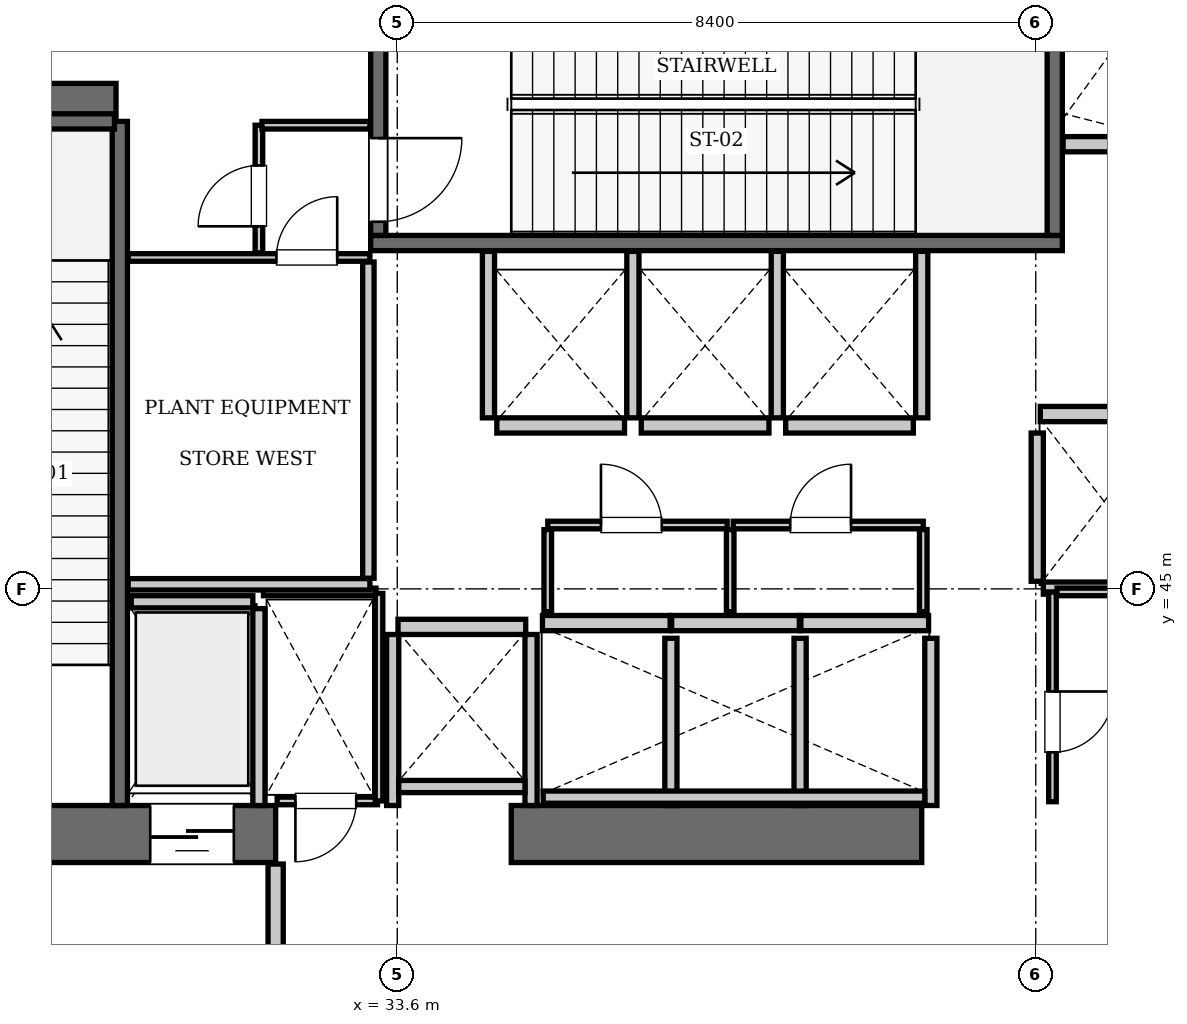
"""IFC4 building model, lengths in metres.
Left out: names, types, materials, properties, quantities, classifications, styles, units other than length and angle.
Written with IfcOpenShell. Run it as: python <this file> out.ifc"""

import sys

from ifc_helpers import new_model, si_unit, direction, frame, frame_2d, origin, place, context, subcontext, project, spatial, rectangle, extrude, element, fill, save


model = new_model("IFC4")
c1 = context("Model", 3, precision=1e-05, world=origin(), true_north=direction((0.0, 1.0)))
c2 = subcontext(c1, "Body", "Model", "MODEL_VIEW")
j1 = project(units=[si_unit("LENGTHUNIT", "METRE"), si_unit("PLANEANGLEUNIT", "RADIAN")], contexts=[c1])
p1 = place(None, origin())
s1 = spatial("IfcSite", under=j1, at=p1, CompositionType="ELEMENT")
p2 = place(p1, origin())
s2 = spatial("IfcBuilding", under=s1, at=p2, CompositionType="ELEMENT")
p3 = place(p2, frame((0.0, 0.0, 227.5)))
s3 = spatial("IfcBuildingStorey", under=s2, at=p3, CompositionType="ELEMENT", Elevation=227.5)
p4 = place(p3, frame((25.2, 41.775, 0.0), z_axis=(0.0, 0.0, 1.0), x_axis=(1.0, 0.0, 0.0)))
e1 = element("IfcWall", 1, at=p4, inside=s3, PredefinedType="SHEAR", context=c2, shape_type="SweptSolid", body=[
    extrude(rectangle(XDim=6.8, YDim=0.75, at=frame_2d((3.4, 0.0))), origin(), (0.0, 0.0, 1.0), 7.0),
])
p5 = place(p4, frame((1.65, 0.0, 0.0)))
e2 = element("IfcOpeningElement", 2, at=p5, cuts=e1, PredefinedType="OPENING", context=c2, shape_type="SweptSolid", body=[
    extrude(rectangle(XDim=1.15, YDim=2.15, at=frame_2d((0.575, 1.075))), frame((0.0, 0.385, 0.0), z_axis=(0.0, -1.0, 0.0), x_axis=(1.0, 0.0, 0.0)), (0.0, 0.0, 1.0), 0.77),
])
p6 = place(p4, frame((5.15, 0.0, 0.0)))
e3 = element("IfcOpeningElement", 3, at=p6, cuts=e1, PredefinedType="OPENING", context=c2, shape_type="SweptSolid", body=[
    extrude(rectangle(XDim=1.1, YDim=2.2, at=frame_2d((0.55, 1.1))), frame((0.0, 0.385, 0.0), z_axis=(0.0, -1.0, 0.0), x_axis=(1.0, 0.0, 0.0)), (0.0, 0.0, 1.0), 0.77),
])
p7 = place(p3, frame((35.1, 41.775, 0.0), z_axis=(0.0, 0.0, 1.0), x_axis=(1.0, 0.0, 0.0)))
e4 = element("IfcWall", 4, at=p7, inside=s3, PredefinedType="SHEAR", context=c2, shape_type="SweptSolid", body=[
    extrude(rectangle(XDim=5.4, YDim=0.75, at=frame_2d((2.7, 0.0))), origin(), (0.0, 0.0, 1.0), 7.0),
])
p8 = place(p3, frame((25.95, 51.4, 0.0), z_axis=(0.0, 0.0, 1.0), x_axis=(1.0, 0.0, 0.0)))
e5 = element("IfcWall", 5, at=p8, inside=s3, PredefinedType="SHEAR", context=c2, shape_type="SweptSolid", body=[
    extrude(rectangle(XDim=3.95, YDim=0.5, at=frame_2d((1.975, 0.0))), origin(), (0.0, 0.0, 1.0), 7.0),
])
p9 = place(p3, frame((29.95, 42.15, 0.0), z_axis=(0.0, 0.0, 1.0), x_axis=(0.0, 1.0, 0.0)))
e6 = element("IfcWall", 6, at=p9, inside=s3, PredefinedType="SOLIDWALL", context=c2, shape_type="SweptSolid", body=[
    extrude(rectangle(XDim=9.0, YDim=0.2, at=frame_2d((4.5, 0.0))), origin(), (0.0, 0.0, 1.0), 6.76),
])
p10 = place(p3, frame((26.38, 51.15, 0.0), z_axis=(0.0, 0.0, 1.0), x_axis=(1.0, 0.0, 0.0)))
e7 = element("IfcWall", 7, at=p10, inside=s3, PredefinedType="SOLIDWALL", context=c2, shape_type="SweptSolid", body=[
    extrude(rectangle(XDim=3.5, YDim=0.2, at=frame_2d((1.75, 0.0))), origin(), (0.0, 0.0, 1.0), 6.76),
])
p11 = place(p3, frame((33.25, 49.55, 0.0), z_axis=(0.0, 0.0, 1.0), x_axis=(1.0, 0.0, 0.0)))
e8 = element("IfcWall", 8, at=p11, inside=s3, PredefinedType="SOLIDWALL", context=c2, shape_type="SweptSolid", body=[
    extrude(rectangle(XDim=9.1, YDim=0.2, at=frame_2d((4.55, 0.0))), origin(), (0.0, 0.0, 1.0), 6.76),
])
p12 = place(p3, frame((42.25, 49.65, 0.0), z_axis=(0.0, 0.0, 1.0), x_axis=(0.0, 1.0, 0.0)))
e9 = element("IfcWall", 9, at=p12, inside=s3, PredefinedType="SOLIDWALL", context=c2, shape_type="SweptSolid", body=[
    extrude(rectangle(XDim=3.6, YDim=0.2, at=frame_2d((1.8, 0.0))), origin(), (0.0, 0.0, 1.0), 6.76),
])
p13 = place(p3, frame((33.35, 49.65, 0.0), z_axis=(0.0, 0.0, 1.0), x_axis=(0.0, 1.0, 0.0)))
e10 = element("IfcWall", 10, at=p13, inside=s3, PredefinedType="SOLIDWALL", context=c2, shape_type="SweptSolid", body=[
    extrude(rectangle(XDim=3.6, YDim=0.2, at=frame_2d((1.8, 0.0))), origin(), (0.0, 0.0, 1.0), 6.76),
])
p14 = place(p13, frame((0.18, 0.0, 0.0)))
e11 = element("IfcOpeningElement", 11, at=p14, cuts=e10, PredefinedType="OPENING", context=c2, shape_type="SweptSolid", body=[
    extrude(rectangle(XDim=1.1, YDim=2.15, at=frame_2d((0.55, 1.075))), frame((0.0, 0.11, 0.0), z_axis=(0.0, -1.0, 0.0), x_axis=(1.0, 0.0, 0.0)), (0.0, 0.0, 1.0), 0.22),
])
p15 = place(p3, frame((42.06, 47.3, 0.0), z_axis=(0.0, 0.0, 1.0), x_axis=(1.0, 0.0, 0.0)))
e12 = element("IfcWall", 12, at=p15, inside=s3, PredefinedType="SOLIDWALL", context=c2, shape_type="SweptSolid", body=[
    extrude(rectangle(XDim=1.68, YDim=0.2, at=frame_2d((0.84, 0.0))), origin(), (0.0, 0.0, 1.0), 6.76),
])
p16 = place(p3, frame((42.36, 50.85, 0.0), z_axis=(0.0, 0.0, 1.0), x_axis=(1.0, 0.0, 0.0)))
e13 = element("IfcWall", 13, at=p16, inside=s3, PredefinedType="SOLIDWALL", context=c2, shape_type="SweptSolid", body=[
    extrude(rectangle(XDim=1.38, YDim=0.2, at=frame_2d((0.69, 0.0))), origin(), (0.0, 0.0, 1.0), 6.76),
])
for number, where, z_axis, x_axis in (
    (14, (35.51, 44.55, 0.0), (0.0, 0.0, 1.0), (1.0, 0.0, 0.0)),
    (15, (37.21, 44.55, 0.0), (0.0, 0.0, 1.0), (1.0, 0.0, 0.0)),
):
    element("IfcWall", number, at=place(p3, frame(where, z_axis=z_axis, x_axis=x_axis)), inside=s3, PredefinedType="SOLIDWALL", context=c2, shape_type="SweptSolid", body=[
        extrude(rectangle(XDim=1.68, YDim=0.2, at=frame_2d((0.84, 0.0))), origin(), (0.0, 0.0, 1.0), 6.76),
    ])
for number, where, z_axis, x_axis in (
    (16, (38.91, 44.55, 0.0), (0.0, 0.0, 1.0), (1.0, 0.0, 0.0)),
    (17, (34.91, 47.15, 0.0), (0.0, 0.0, 1.0), (1.0, 0.0, 0.0)),
):
    element("IfcWall", number, at=place(p3, frame(where, z_axis=z_axis, x_axis=x_axis)), inside=s3, PredefinedType="SOLIDWALL", context=c2, shape_type="SweptSolid", body=[
        extrude(rectangle(XDim=1.68, YDim=0.2, at=frame_2d((0.84, 0.0))), origin(), (0.0, 0.0, 1.0), 6.76),
    ])
for number, where, z_axis, x_axis in (
    (18, (36.81, 47.15, 0.0), (0.0, 0.0, 1.0), (1.0, 0.0, 0.0)),
    (19, (38.71, 47.15, 0.0), (0.0, 0.0, 1.0), (1.0, 0.0, 0.0)),
    (20, (33.61, 44.5, 0.0), (0.0, 0.0, 1.0), (1.0, 0.0, 0.0)),
):
    element("IfcWall", number, at=place(p3, frame(where, z_axis=z_axis, x_axis=x_axis)), inside=s3, PredefinedType="SOLIDWALL", context=c2, shape_type="SweptSolid", body=[
        extrude(rectangle(XDim=1.68, YDim=0.2, at=frame_2d((0.84, 0.0))), origin(), (0.0, 0.0, 1.0), 6.76),
    ])
p17 = place(p3, frame((30.1, 44.83, 0.0), z_axis=(0.0, 0.0, 1.0), x_axis=(1.0, 0.0, 0.0)))
e21 = element("IfcWall", 21, at=p17, inside=s3, PredefinedType="SOLIDWALL", context=c2, shape_type="SweptSolid", body=[
    extrude(rectangle(XDim=1.6, YDim=0.16, at=frame_2d((0.8, 0.0))), origin(), (0.0, 0.0, 1.0), 6.76),
])
p18 = place(p3, frame((31.78, 42.15, 0.0), z_axis=(0.0, 0.0, 1.0), x_axis=(0.0, 1.0, 0.0)))
e22 = element("IfcWall", 22, at=p18, inside=s3, PredefinedType="SOLIDWALL", context=c2, shape_type="SweptSolid", body=[
    extrude(rectangle(XDim=2.59, YDim=0.16, at=frame_2d((1.295, 0.0))), origin(), (0.0, 0.0, 1.0), 6.76),
])
p19 = place(p3, frame((42.02, 45.1, 0.0), z_axis=(0.0, 0.0, 1.0), x_axis=(0.0, 1.0, 0.0)))
e23 = element("IfcWall", 23, at=p19, inside=s3, PredefinedType="SOLIDWALL", context=c2, shape_type="SweptSolid", body=[
    extrude(rectangle(XDim=1.95, YDim=0.16, at=frame_2d((0.975, 0.0))), origin(), (0.0, 0.0, 1.0), 6.76),
])
p20 = place(p3, frame((42.1, 45.01, 0.0), z_axis=(0.0, 0.0, 1.0), x_axis=(1.0, 0.0, 0.0)))
e24 = element("IfcWall", 24, at=p20, inside=s3, PredefinedType="SOLIDWALL", context=c2, shape_type="SweptSolid", body=[
    extrude(rectangle(XDim=3.45, YDim=0.16, at=frame_2d((1.725, 0.0))), origin(), (0.0, 0.0, 1.0), 6.76),
])
for number, where, z_axis, x_axis in (
    (25, (37.2, 42.15, 0.0), (0.0, 0.0, 1.0), (0.0, 1.0, 0.0)),
    (26, (38.9, 42.15, 0.0), (0.0, 0.0, 1.0), (0.0, 1.0, 0.0)),
    (27, (40.62, 42.15, 0.0), (0.0, 0.0, 1.0), (0.0, 1.0, 0.0)),
):
    element("IfcWall", number, at=place(p3, frame(where, z_axis=z_axis, x_axis=x_axis)), inside=s3, PredefinedType="SOLIDWALL", context=c2, shape_type="SweptSolid", body=[
        extrude(rectangle(XDim=2.2, YDim=0.16, at=frame_2d((1.1, 0.0))), origin(), (0.0, 0.0, 1.0), 6.76),
    ])
p21 = place(p3, frame((35.52, 42.26, 0.0), z_axis=(0.0, 0.0, 1.0), x_axis=(1.0, 0.0, 0.0)))
e28 = element("IfcWall", 28, at=p21, inside=s3, PredefinedType="SOLIDWALL", context=c2, shape_type="SweptSolid", body=[
    extrude(rectangle(XDim=5.02, YDim=0.16, at=frame_2d((2.51, 0.0))), origin(), (0.0, 0.0, 1.0), 6.76),
])
for number, where, z_axis, x_axis in (
    (29, (34.8, 47.25, 0.0), (0.0, 0.0, 1.0), (0.0, 1.0, 0.0)),
    (30, (36.7, 47.25, 0.0), (0.0, 0.0, 1.0), (0.0, 1.0, 0.0)),
    (31, (38.6, 47.25, 0.0), (0.0, 0.0, 1.0), (0.0, 1.0, 0.0)),
    (32, (40.5, 47.25, 0.0), (0.0, 0.0, 1.0), (0.0, 1.0, 0.0)),
):
    element("IfcWall", number, at=place(p3, frame(where, z_axis=z_axis, x_axis=x_axis)), inside=s3, PredefinedType="SOLIDWALL", context=c2, shape_type="SweptSolid", body=[
        extrude(rectangle(XDim=2.19, YDim=0.16, at=frame_2d((1.095, 0.0))), origin(), (0.0, 0.0, 1.0), 6.76),
    ])
for number, where, z_axis, x_axis in (
    (33, (33.54, 42.15, 0.0), (0.0, 0.0, 1.0), (0.0, 1.0, 0.0)),
    (34, (35.36, 42.15, 0.0), (0.0, 0.0, 1.0), (0.0, 1.0, 0.0)),
):
    element("IfcWall", number, at=place(p3, frame(where, z_axis=z_axis, x_axis=x_axis)), inside=s3, PredefinedType="SOLIDWALL", context=c2, shape_type="SweptSolid", body=[
        extrude(rectangle(XDim=2.25, YDim=0.16, at=frame_2d((1.125, 0.0))), origin(), (0.0, 0.0, 1.0), 6.76),
    ])
p22 = place(p3, frame((33.62, 42.4, 0.0), z_axis=(0.0, 0.0, 1.0), x_axis=(1.0, 0.0, 0.0)))
e35 = element("IfcWall", 35, at=p22, inside=s3, PredefinedType="SOLIDWALL", context=c2, shape_type="SweptSolid", body=[
    extrude(rectangle(XDim=1.66, YDim=0.16, at=frame_2d((0.83, 0.0))), origin(), (0.0, 0.0, 1.0), 6.76),
])
p23 = place(p3, frame((32.0, 38.31, 0.0), z_axis=(0.0, 0.0, 1.0), x_axis=(0.0, 1.0, 0.0)))
e36 = element("IfcWall", 36, at=p23, inside=s3, PredefinedType="PARTITIONING", context=c2, shape_type="SweptSolid", body=[
    extrude(rectangle(XDim=3.07, YDim=0.2, at=frame_2d((1.535, 0.0))), origin(), (0.0, 0.0, 1.0), 6.76),
])
p24 = place(p3, frame((32.02, 42.21, 0.0), z_axis=(0.0, 0.0, 1.0), x_axis=(1.0, 0.0, 0.0)))
e37 = element("IfcWall", 37, at=p24, inside=s3, PredefinedType="PARTITIONING", context=c2, shape_type="SweptSolid", body=[
    extrude(rectangle(XDim=1.32, YDim=0.1, at=frame_2d((0.66, 0.0))), origin(), (0.0, 0.0, 1.0), 6.76),
])
p25 = place(p24, frame((0.24, 0.0, 0.0)))
e38 = element("IfcOpeningElement", 38, at=p25, cuts=e37, PredefinedType="OPENING", context=c2, shape_type="SweptSolid", body=[
    extrude(rectangle(XDim=0.8, YDim=2.05, at=frame_2d((0.4, 1.025))), frame((0.0, 0.06, 0.0), z_axis=(0.0, -1.0, 0.0), x_axis=(1.0, 0.0, 0.0)), (0.0, 0.0, 1.0), 0.12),
])
p26 = place(p3, frame((31.84, 44.96, 0.0), z_axis=(0.0, 0.0, 1.0), x_axis=(1.0, 0.0, 0.0)))
e39 = element("IfcWall", 39, at=p26, inside=s3, PredefinedType="PARTITIONING", context=c2, shape_type="SweptSolid", body=[
    extrude(rectangle(XDim=1.48, YDim=0.1, at=frame_2d((0.74, 0.0))), origin(), (0.0, 0.0, 1.0), 6.76),
])
p27 = place(p3, frame((33.36, 42.21, 0.0), z_axis=(0.0, 0.0, 1.0), x_axis=(0.0, 1.0, 0.0)))
e40 = element("IfcWall", 40, at=p27, inside=s3, PredefinedType="PARTITIONING", context=c2, shape_type="SweptSolid", body=[
    extrude(rectangle(XDim=2.73, YDim=0.1, at=frame_2d((1.365, 0.0))), origin(), (0.0, 0.0, 1.0), 6.76),
])
p28 = place(p3, frame((35.58, 45.84, 0.0), z_axis=(0.0, 0.0, 1.0), x_axis=(1.0, 0.0, 0.0)))
e41 = element("IfcWall", 41, at=p28, inside=s3, PredefinedType="PARTITIONING", context=c2, shape_type="SweptSolid", body=[
    extrude(rectangle(XDim=2.36, YDim=0.1, at=frame_2d((1.18, 0.0))), origin(), (0.0, 0.0, 1.0), 6.76),
])
p29 = place(p28, frame((0.7, 0.0, 0.0)))
e42 = element("IfcOpeningElement", 42, at=p29, cuts=e41, PredefinedType="OPENING", context=c2, shape_type="SweptSolid", body=[
    extrude(rectangle(XDim=0.8, YDim=2.05, at=frame_2d((0.4, 1.025))), frame((0.0, 0.06, 0.0), z_axis=(0.0, -1.0, 0.0), x_axis=(1.0, 0.0, 0.0)), (0.0, 0.0, 1.0), 0.12),
])
p30 = place(p3, frame((38.02, 45.84, 0.0), z_axis=(0.0, 0.0, 1.0), x_axis=(1.0, 0.0, 0.0)))
e43 = element("IfcWall", 43, at=p30, inside=s3, PredefinedType="PARTITIONING", context=c2, shape_type="SweptSolid", body=[
    extrude(rectangle(XDim=2.5, YDim=0.1, at=frame_2d((1.25, 0.0))), origin(), (0.0, 0.0, 1.0), 6.76),
])
p31 = place(p30, frame((0.75, 0.0, 0.0)))
e44 = element("IfcOpeningElement", 44, at=p31, cuts=e43, PredefinedType="OPENING", context=c2, shape_type="SweptSolid", body=[
    extrude(rectangle(XDim=0.8, YDim=2.05, at=frame_2d((0.4, 1.025))), frame((0.0, 0.06, 0.0), z_axis=(0.0, -1.0, 0.0), x_axis=(1.0, 0.0, 0.0)), (0.0, 0.0, 1.0), 0.12),
])
for number, where, z_axis, x_axis in (
    (45, (35.58, 44.7, 0.0), (0.0, 0.0, 1.0), (0.0, 1.0, 0.0)),
    (46, (37.98, 44.7, 0.0), (0.0, 0.0, 1.0), (0.0, 1.0, 0.0)),
    (47, (40.52, 44.7, 0.0), (0.0, 0.0, 1.0), (0.0, 1.0, 0.0)),
):
    element("IfcWall", number, at=place(p3, frame(where, z_axis=z_axis, x_axis=x_axis)), inside=s3, PredefinedType="PARTITIONING", context=c2, shape_type="SweptSolid", body=[
        extrude(rectangle(XDim=1.08, YDim=0.1, at=frame_2d((0.54, 0.0))), origin(), (0.0, 0.0, 1.0), 6.76),
    ])
p32 = place(p3, frame((42.22, 42.2, 0.0), z_axis=(0.0, 0.0, 1.0), x_axis=(0.0, 1.0, 0.0)))
e48 = element("IfcWall", 48, at=p32, inside=s3, PredefinedType="PARTITIONING", context=c2, shape_type="SweptSolid", body=[
    extrude(rectangle(XDim=2.76, YDim=0.1, at=frame_2d((1.38, 0.0))), origin(), (0.0, 0.0, 1.0), 6.76),
])
p33 = place(p32, frame((0.65, 0.0, 0.0)))
e49 = element("IfcOpeningElement", 49, at=p33, cuts=e48, PredefinedType="OPENING", context=c2, shape_type="SweptSolid", body=[
    extrude(rectangle(XDim=0.8, YDim=2.05, at=frame_2d((0.4, 1.025))), frame((0.0, 0.06, 0.0), z_axis=(0.0, -1.0, 0.0), x_axis=(1.0, 0.0, 0.0)), (0.0, 0.0, 1.0), 0.12),
])
p34 = place(p3, frame((42.28, 44.96, 0.0), z_axis=(0.0, 0.0, 1.0), x_axis=(1.0, 0.0, 0.0)))
e50 = element("IfcWall", 50, at=p34, inside=s3, PredefinedType="PARTITIONING", context=c2, shape_type="SweptSolid", body=[
    extrude(rectangle(XDim=1.3, YDim=0.1, at=frame_2d((0.65, 0.0))), origin(), (0.0, 0.0, 1.0), 6.76),
])
p35 = place(p3, frame((30.06, 45.06, 0.0), z_axis=(0.0, 0.0, 1.0), x_axis=(1.0, 0.0, 0.0)))
e51 = element("IfcWall", 51, at=p35, inside=s3, PredefinedType="PARTITIONING", context=c2, shape_type="SweptSolid", body=[
    extrude(rectangle(XDim=3.18, YDim=0.15, at=frame_2d((1.59, 0.0))), origin(), (0.0, 0.0, 1.0), 6.76),
])
p36 = place(p3, frame((33.22, 45.14, 0.0), z_axis=(0.0, 0.0, 1.0), x_axis=(0.0, 1.0, 0.0)))
e52 = element("IfcWall", 52, at=p36, inside=s3, PredefinedType="PARTITIONING", context=c2, shape_type="SweptSolid", body=[
    extrude(rectangle(XDim=4.16, YDim=0.15, at=frame_2d((2.08, 0.0))), origin(), (0.0, 0.0, 1.0), 6.76),
])
p37 = place(p3, frame((30.06, 49.36, 0.0), z_axis=(0.0, 0.0, 1.0), x_axis=(1.0, 0.0, 0.0)))
e53 = element("IfcWall", 53, at=p37, inside=s3, PredefinedType="PARTITIONING", context=c2, shape_type="SweptSolid", body=[
    extrude(rectangle(XDim=3.18, YDim=0.1, at=frame_2d((1.59, 0.0))), origin(), (0.0, 0.0, 1.0), 6.76),
])
p38 = place(p37, frame((1.95, 0.0, 0.0)))
e54 = element("IfcOpeningElement", 54, at=p38, cuts=e53, PredefinedType="OPENING", context=c2, shape_type="SweptSolid", body=[
    extrude(rectangle(XDim=0.8, YDim=2.05, at=frame_2d((0.4, 1.025))), frame((0.0, 0.06, 0.0), z_axis=(0.0, -1.0, 0.0), x_axis=(1.0, 0.0, 0.0)), (0.0, 0.0, 1.0), 0.12),
])
p39 = place(p3, frame((31.78, 49.42, 0.0), z_axis=(0.0, 0.0, 1.0), x_axis=(0.0, 1.0, 0.0)))
e55 = element("IfcWall", 55, at=p39, inside=s3, PredefinedType="PARTITIONING", context=c2, shape_type="SweptSolid", body=[
    extrude(rectangle(XDim=1.68, YDim=0.1, at=frame_2d((0.84, 0.0))), origin(), (0.0, 0.0, 1.0), 6.76),
])
p40 = place(p39, frame((0.35, 0.0, 0.0)))
e56 = element("IfcOpeningElement", 56, at=p40, cuts=e55, PredefinedType="OPENING", context=c2, shape_type="SweptSolid", body=[
    extrude(rectangle(XDim=0.8, YDim=2.05, at=frame_2d((0.4, 1.025))), frame((0.0, 0.06, 0.0), z_axis=(0.0, -1.0, 0.0), x_axis=(1.0, 0.0, 0.0)), (0.0, 0.0, 1.0), 0.12),
])
p41 = place(p3, frame((31.82, 51.1, 0.0), z_axis=(0.0, 0.0, 1.0), x_axis=(1.0, 0.0, 0.0)))
e57 = element("IfcWall", 57, at=p41, inside=s3, PredefinedType="PARTITIONING", context=c2, shape_type="SweptSolid", body=[
    extrude(rectangle(XDim=1.42, YDim=0.1, at=frame_2d((0.71, 0.0))), origin(), (0.0, 0.0, 1.0), 6.76),
])
p42 = place(p14, frame((1.1, 0.0, 0.0), z_axis=(0.0, 0.0, 1.0), x_axis=(-1.0, 0.0, 0.0)))
e58 = element("IfcDoor", 58, at=p42, inside=s3, OperationType="SINGLE_SWING_LEFT", PredefinedType="DOOR", context=c2, shape_type="SweptSolid", body=[
    extrude(rectangle(XDim=1.1, YDim=2.15, at=frame_2d((0.55, 1.075))), frame((0.0, 0.025, 0.0), z_axis=(0.0, -1.0, 0.0), x_axis=(1.0, 0.0, 0.0)), (0.0, 0.0, 1.0), 0.05),
])
fill(e11, e58)
p43 = place(p6, frame((1.1, 0.0, 0.0), z_axis=(0.0, 0.0, 1.0), x_axis=(-1.0, 0.0, 0.0)))
e59 = element("IfcDoor", 59, at=p43, inside=s3, OperationType="SLIDING_TO_LEFT", PredefinedType="DOOR", context=c2, shape_type="SweptSolid", body=[
    extrude(rectangle(XDim=1.1, YDim=2.2, at=frame_2d((0.55, 1.1))), frame((0.0, 0.025, 0.0), z_axis=(0.0, -1.0, 0.0), x_axis=(1.0, 0.0, 0.0)), (0.0, 0.0, 1.0), 0.05),
])
fill(e3, e59)
p44 = place(p25, frame((0.8, 0.0, 0.0), z_axis=(0.0, 0.0, 1.0), x_axis=(-1.0, 0.0, 0.0)))
e60 = element("IfcDoor", 60, at=p44, inside=s3, OperationType="SINGLE_SWING_RIGHT", PredefinedType="DOOR", context=c2, shape_type="SweptSolid", body=[
    extrude(rectangle(XDim=0.8, YDim=2.05, at=frame_2d((0.4, 1.025))), frame((0.0, 0.025, 0.0), z_axis=(0.0, -1.0, 0.0), x_axis=(1.0, 0.0, 0.0)), (0.0, 0.0, 1.0), 0.05),
])
fill(e38, e60)
p45 = place(p29, origin())
e61 = element("IfcDoor", 61, at=p45, inside=s3, OperationType="SINGLE_SWING_LEFT", PredefinedType="DOOR", context=c2, shape_type="SweptSolid", body=[
    extrude(rectangle(XDim=0.8, YDim=2.05, at=frame_2d((0.4, 1.025))), frame((0.0, 0.025, 0.0), z_axis=(0.0, -1.0, 0.0), x_axis=(1.0, 0.0, 0.0)), (0.0, 0.0, 1.0), 0.05),
])
fill(e42, e61)
p46 = place(p31, origin())
e62 = element("IfcDoor", 62, at=p46, inside=s3, OperationType="SINGLE_SWING_RIGHT", PredefinedType="DOOR", context=c2, shape_type="SweptSolid", body=[
    extrude(rectangle(XDim=0.8, YDim=2.05, at=frame_2d((0.4, 1.025))), frame((0.0, 0.025, 0.0), z_axis=(0.0, -1.0, 0.0), x_axis=(1.0, 0.0, 0.0)), (0.0, 0.0, 1.0), 0.05),
])
fill(e44, e62)
p47 = place(p33, frame((0.8, 0.0, 0.0), z_axis=(0.0, 0.0, 1.0), x_axis=(-1.0, 0.0, 0.0)))
e63 = element("IfcDoor", 63, at=p47, inside=s3, OperationType="SINGLE_SWING_LEFT", PredefinedType="DOOR", context=c2, shape_type="SweptSolid", body=[
    extrude(rectangle(XDim=0.8, YDim=2.05, at=frame_2d((0.4, 1.025))), frame((0.0, 0.025, 0.0), z_axis=(0.0, -1.0, 0.0), x_axis=(1.0, 0.0, 0.0)), (0.0, 0.0, 1.0), 0.05),
])
fill(e49, e63)
p48 = place(p38, origin())
e64 = element("IfcDoor", 64, at=p48, inside=s3, OperationType="SINGLE_SWING_RIGHT", PredefinedType="DOOR", context=c2, shape_type="SweptSolid", body=[
    extrude(rectangle(XDim=0.8, YDim=2.05, at=frame_2d((0.4, 1.025))), frame((0.0, 0.025, 0.0), z_axis=(0.0, -1.0, 0.0), x_axis=(1.0, 0.0, 0.0)), (0.0, 0.0, 1.0), 0.05),
])
fill(e54, e64)
p49 = place(p40, origin())
e65 = element("IfcDoor", 65, at=p49, inside=s3, OperationType="SINGLE_SWING_LEFT", PredefinedType="DOOR", context=c2, shape_type="SweptSolid", body=[
    extrude(rectangle(XDim=0.8, YDim=2.05, at=frame_2d((0.4, 1.025))), frame((0.0, 0.025, 0.0), z_axis=(0.0, -1.0, 0.0), x_axis=(1.0, 0.0, 0.0)), (0.0, 0.0, 1.0), 0.05),
])
fill(e56, e65)
save(model, sys.argv[1])
